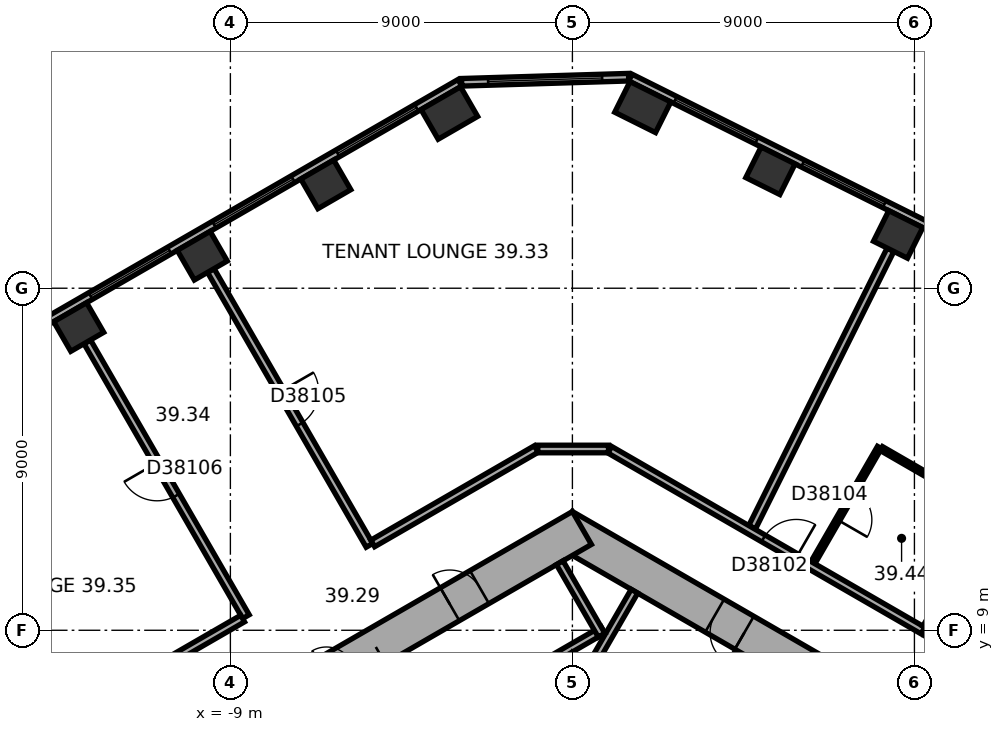
"""IFC4 building model, lengths in metres.
Left out: names, types, materials, properties, quantities, classifications, styles, units other than length and angle.
Written with IfcOpenShell. Run it as: python <this file> out.ifc"""

import sys

from ifc_helpers import new_model, si_unit, direction, frame, frame_2d, origin, origin_2d, place, context, subcontext, project, spatial, rectangle, extrude, element, fill, save


model = new_model("IFC4")
c1 = context("Model", 3, precision=1e-05, world=origin(), true_north=direction((0.0, 1.0)))
c2 = subcontext(c1, "Body", "Model", "MODEL_VIEW")
j1 = project(units=[si_unit("LENGTHUNIT", "METRE"), si_unit("PLANEANGLEUNIT", "RADIAN")], contexts=[c1])
p1 = place(None, origin())
s1 = spatial("IfcSite", under=j1, at=p1, CompositionType="ELEMENT")
p2 = place(p1, origin())
s2 = spatial("IfcBuilding", under=s1, at=p2, CompositionType="ELEMENT")
p3 = place(p2, frame((0.0, 0.0, 161.4)))
s3 = spatial("IfcBuildingStorey", under=s2, at=p3, CompositionType="ELEMENT", Elevation=161.4)
for number, where, z_axis, x_axis in (
    (1, (8.571, 19.416, 0.0), (0.0, 0.0, 1.0), (-0.895, 0.446, 0.0)),
    (2, (5.211, 21.091, 0.0), (0.0, 0.0, 1.0), (-0.895, 0.446, 0.0)),
):
    element("IfcColumn", number, at=place(p3, frame(where, z_axis=z_axis, x_axis=x_axis)), inside=s3, PredefinedType="COLUMN", context=c2, shape_type="SweptSolid", body=[
        extrude(rectangle(XDim=1.0, YDim=0.9, at=origin_2d()), origin(), (0.0, 0.0, 1.0), 3.7),
    ])
for number, where, z_axis, x_axis in (
    (3, (1.852, 22.766, 0.0), (0.0, 0.0, 1.0), (-0.895, 0.446, 0.0)),
    (4, (-3.238, 22.61, 0.0), (0.0, 0.0, 1.0), (-0.866, -0.5, 0.0)),
):
    element("IfcColumn", number, at=place(p3, frame(where, z_axis=z_axis, x_axis=x_axis)), inside=s3, PredefinedType="COLUMN", context=c2, shape_type="SweptSolid", body=[
        extrude(rectangle(XDim=1.2, YDim=0.9, at=origin_2d()), origin(), (0.0, 0.0, 1.0), 3.7),
    ])
for number, where, z_axis, x_axis in (
    (5, (-6.489, 20.733, 0.0), (0.0, 0.0, 1.0), (-0.866, -0.5, 0.0)),
    (6, (-9.74, 18.856, 0.0), (0.0, 0.0, 1.0), (-0.866, -0.5, 0.0)),
    (7, (-12.991, 16.979, 0.0), (0.0, 0.0, 1.0), (-0.866, -0.5, 0.0)),
):
    element("IfcColumn", number, at=place(p3, frame(where, z_axis=z_axis, x_axis=x_axis)), inside=s3, PredefinedType="COLUMN", context=c2, shape_type="SweptSolid", body=[
        extrude(rectangle(XDim=1.0, YDim=0.9, at=origin_2d()), origin(), (0.0, 0.0, 1.0), 3.7),
    ])
p4 = place(p3, frame((10.25, 5.629, 0.0), z_axis=(0.0, 0.0, 1.0), x_axis=(-0.866022616891, 0.50000482701, 0.0)))
e8 = element("IfcWall", 8, at=p4, inside=s3, PredefinedType="SHEAR", context=c2, shape_type="SweptSolid", body=[
    extrude(rectangle(XDim=12.125, YDim=1.0, at=frame_2d((6.062, 0.0))), origin(), (0.0, 0.0, 1.0), 3.7),
])
p5 = place(p4, frame((2.712, 0.0, 0.0)))
e9 = element("IfcOpeningElement", 9, at=p5, cuts=e8, PredefinedType="OPENING", context=c2, shape_type="SweptSolid", body=[
    extrude(rectangle(XDim=0.9, YDim=2.1, at=frame_2d((0.45, 1.05))), frame((0.0, 0.51, 0.0), z_axis=(0.0, -1.0, 0.0), x_axis=(1.0, 0.0, 0.0)), (0.0, 0.0, 1.0), 1.02),
])
p6 = place(p4, frame((6.612, 0.0, 0.0)))
e10 = element("IfcOpeningElement", 10, at=p6, cuts=e8, PredefinedType="OPENING", context=c2, shape_type="SweptSolid", body=[
    extrude(rectangle(XDim=0.9, YDim=2.1, at=frame_2d((0.45, 1.05))), frame((0.0, 0.51, 0.0), z_axis=(0.0, -1.0, 0.0), x_axis=(1.0, 0.0, 0.0)), (0.0, 0.0, 1.0), 1.02),
])
p7 = place(p3, frame((0.25, 11.691, 0.0), z_axis=(0.0, 0.0, 1.0), x_axis=(-0.866022616891, -0.50000482701, 0.0)))
e11 = element("IfcWall", 11, at=p7, inside=s3, PredefinedType="SHEAR", context=c2, shape_type="SweptSolid", body=[
    extrude(rectangle(XDim=12.125, YDim=1.0, at=frame_2d((6.062, 0.0))), origin(), (0.0, 0.0, 1.0), 3.7),
])
p8 = place(p7, frame((6.262, 0.0, 0.0)))
e12 = element("IfcOpeningElement", 12, at=p8, cuts=e11, PredefinedType="OPENING", context=c2, shape_type="SweptSolid", body=[
    extrude(rectangle(XDim=1.5, YDim=2.1, at=frame_2d((0.75, 1.05))), frame((0.0, 0.51, 0.0), z_axis=(0.0, -1.0, 0.0), x_axis=(1.0, 0.0, 0.0)), (0.0, 0.0, 1.0), 1.02),
])
p9 = place(p7, frame((3.112, 0.0, 0.0)))
e13 = element("IfcOpeningElement", 13, at=p9, cuts=e11, PredefinedType="OPENING", context=c2, shape_type="SweptSolid", body=[
    extrude(rectangle(XDim=0.9, YDim=2.1, at=frame_2d((0.45, 1.05))), frame((0.0, 0.51, 0.0), z_axis=(0.0, -1.0, 0.0), x_axis=(1.0, 0.0, 0.0)), (0.0, 0.0, 1.0), 1.02),
])
p10 = place(p3, frame((19.464, 14.599, 0.0), z_axis=(0.0, 0.0, 1.0), x_axis=(-0.894935755043, 0.446195018289, 0.0)))
e14 = element("IfcWall", 14, at=p10, inside=s3, PredefinedType="STANDARD", context=c2, shape_type="SweptSolid", body=[
    extrude(rectangle(XDim=20.044, YDim=0.2, at=frame_2d((10.022, 0.0))), origin(), (0.0, 0.0, 1.0), 3.7),
])
p11 = place(p10, frame((1.313, 0.0, 0.9)))
e15 = element("IfcOpeningElement", 15, at=p11, cuts=e14, PredefinedType="OPENING", context=c2, shape_type="SweptSolid", body=[
    extrude(rectangle(XDim=2.4, YDim=2.0, at=frame_2d((1.2, 1.0))), frame((0.0, 0.11, 0.0), z_axis=(0.0, -1.0, 0.0), x_axis=(1.0, 0.0, 0.0)), (0.0, 0.0, 1.0), 0.22),
])
p12 = place(p10, frame((5.067, 0.0, 0.9)))
e16 = element("IfcOpeningElement", 16, at=p12, cuts=e14, PredefinedType="OPENING", context=c2, shape_type="SweptSolid", body=[
    extrude(rectangle(XDim=2.4, YDim=2.0, at=frame_2d((1.2, 1.0))), frame((0.0, 0.11, 0.0), z_axis=(0.0, -1.0, 0.0), x_axis=(1.0, 0.0, 0.0)), (0.0, 0.0, 1.0), 0.22),
])
p13 = place(p10, frame((8.821, 0.0, 0.9)))
e17 = element("IfcOpeningElement", 17, at=p13, cuts=e14, PredefinedType="OPENING", context=c2, shape_type="SweptSolid", body=[
    extrude(rectangle(XDim=2.4, YDim=2.0, at=frame_2d((1.2, 1.0))), frame((0.0, 0.11, 0.0), z_axis=(0.0, -1.0, 0.0), x_axis=(1.0, 0.0, 0.0)), (0.0, 0.0, 1.0), 0.22),
])
p14 = place(p10, frame((12.575, 0.0, 0.9)))
e18 = element("IfcOpeningElement", 18, at=p14, cuts=e14, PredefinedType="OPENING", context=c2, shape_type="SweptSolid", body=[
    extrude(rectangle(XDim=2.4, YDim=2.0, at=frame_2d((1.2, 1.0))), frame((0.0, 0.11, 0.0), z_axis=(0.0, -1.0, 0.0), x_axis=(1.0, 0.0, 0.0)), (0.0, 0.0, 1.0), 0.22),
])
p15 = place(p10, frame((16.329, 0.0, 0.9)))
e19 = element("IfcOpeningElement", 19, at=p15, cuts=e14, PredefinedType="OPENING", context=c2, shape_type="SweptSolid", body=[
    extrude(rectangle(XDim=2.4, YDim=2.0, at=frame_2d((1.2, 1.0))), frame((0.0, 0.11, 0.0), z_axis=(0.0, -1.0, 0.0), x_axis=(1.0, 0.0, 0.0)), (0.0, 0.0, 1.0), 0.22),
])
p16 = place(p3, frame((1.479, 23.553, 0.0), z_axis=(0.0, 0.0, 1.0), x_axis=(-0.999534786117, -0.03049936625, 0.0)))
e20 = element("IfcWall", 20, at=p16, inside=s3, PredefinedType="STANDARD", context=c2, shape_type="SweptSolid", body=[
    extrude(rectangle(XDim=4.395, YDim=0.2, at=frame_2d((2.197, 0.0))), origin(), (0.0, 0.0, 1.0), 3.7),
])
p17 = place(p16, frame((0.698, 0.0, 0.9)))
e21 = element("IfcOpeningElement", 21, at=p17, cuts=e20, PredefinedType="OPENING", context=c2, shape_type="SweptSolid", body=[
    extrude(rectangle(XDim=3.0, YDim=2.0, at=frame_2d((1.5, 1.0))), frame((0.0, 0.11, 0.0), z_axis=(0.0, -1.0, 0.0), x_axis=(1.0, 0.0, 0.0)), (0.0, 0.0, 1.0), 0.22),
])
p18 = place(p3, frame((-2.961, 23.405, 0.0), z_axis=(0.0, 0.0, 1.0), x_axis=(-0.866023315909, -0.500003616288, 0.0)))
e22 = element("IfcWall", 22, at=p18, inside=s3, PredefinedType="STANDARD", context=c2, shape_type="SweptSolid", body=[
    extrude(rectangle(XDim=20.044, YDim=0.2, at=frame_2d((10.022, 0.0))), origin(), (0.0, 0.0, 1.0), 3.7),
])
p19 = place(p18, frame((1.314, 0.0, 0.9)))
e23 = element("IfcOpeningElement", 23, at=p19, cuts=e22, PredefinedType="OPENING", context=c2, shape_type="SweptSolid", body=[
    extrude(rectangle(XDim=2.4, YDim=2.0, at=frame_2d((1.2, 1.0))), frame((0.0, 0.11, 0.0), z_axis=(0.0, -1.0, 0.0), x_axis=(1.0, 0.0, 0.0)), (0.0, 0.0, 1.0), 0.22),
])
p20 = place(p18, frame((5.069, 0.0, 0.9)))
e24 = element("IfcOpeningElement", 24, at=p20, cuts=e22, PredefinedType="OPENING", context=c2, shape_type="SweptSolid", body=[
    extrude(rectangle(XDim=2.4, YDim=2.0, at=frame_2d((1.2, 1.0))), frame((0.0, 0.11, 0.0), z_axis=(0.0, -1.0, 0.0), x_axis=(1.0, 0.0, 0.0)), (0.0, 0.0, 1.0), 0.22),
])
p21 = place(p18, frame((8.823, 0.0, 0.9)))
e25 = element("IfcOpeningElement", 25, at=p21, cuts=e22, PredefinedType="OPENING", context=c2, shape_type="SweptSolid", body=[
    extrude(rectangle(XDim=2.4, YDim=2.0, at=frame_2d((1.2, 1.0))), frame((0.0, 0.11, 0.0), z_axis=(0.0, -1.0, 0.0), x_axis=(1.0, 0.0, 0.0)), (0.0, 0.0, 1.0), 0.22),
])
p22 = place(p18, frame((12.577, 0.0, 0.9)))
e26 = element("IfcOpeningElement", 26, at=p22, cuts=e22, PredefinedType="OPENING", context=c2, shape_type="SweptSolid", body=[
    extrude(rectangle(XDim=2.4, YDim=2.0, at=frame_2d((1.2, 1.0))), frame((0.0, 0.11, 0.0), z_axis=(0.0, -1.0, 0.0), x_axis=(1.0, 0.0, 0.0)), (0.0, 0.0, 1.0), 0.22),
])
p23 = place(p18, frame((16.331, 0.0, 0.9)))
e27 = element("IfcOpeningElement", 27, at=p23, cuts=e22, PredefinedType="OPENING", context=c2, shape_type="SweptSolid", body=[
    extrude(rectangle(XDim=2.4, YDim=2.0, at=frame_2d((1.2, 1.0))), frame((0.0, 0.11, 0.0), z_axis=(0.0, -1.0, 0.0), x_axis=(1.0, 0.0, 0.0)), (0.0, 0.0, 1.0), 0.22),
])
p24 = place(p3, frame((0.532, 8.122, 0.0), z_axis=(0.0, 0.0, 1.0), x_axis=(0.500077893725, 0.86598042715, 0.0)))
e28 = element("IfcWall", 28, at=p24, inside=s3, PredefinedType="PARTITIONING", context=c2, shape_type="SweptSolid", body=[
    extrude(rectangle(XDim=2.2, YDim=0.2, at=frame_2d((1.1, 0.0))), origin(), (0.0, 0.0, 1.0), 3.42),
])
p25 = place(p3, frame((0.803, 9.009, 0.0), z_axis=(0.0, 0.0, 1.0), x_axis=(-0.866028230842, -0.499995103361, 0.0)))
e29 = element("IfcWall", 29, at=p25, inside=s3, PredefinedType="PARTITIONING", context=c2, shape_type="SweptSolid", body=[
    extrude(rectangle(XDim=5.4, YDim=0.2, at=frame_2d((2.7, 0.0))), origin(), (0.0, 0.0, 1.0), 3.42),
])
p26 = place(p3, frame((0.767, 8.872, 0.0), z_axis=(0.0, 0.0, 1.0), x_axis=(-0.499994660107, 0.866028486751, 0.0)))
e30 = element("IfcWall", 30, at=p26, inside=s3, PredefinedType="PARTITIONING", context=c2, shape_type="SweptSolid", body=[
    extrude(rectangle(XDim=2.2, YDim=0.2, at=frame_2d((1.1, 0.0))), origin(), (0.0, 0.0, 1.0), 3.42),
])
p27 = place(p3, frame((-2.216, 4.282, 0.0), z_axis=(0.0, 0.0, 1.0), x_axis=(0.499977259774, 0.866038532462, 0.0)))
e31 = element("IfcWall", 31, at=p27, inside=s3, PredefinedType="SHEAR", context=c2, shape_type="SweptSolid", body=[
    extrude(rectangle(XDim=4.7, YDim=0.3, at=frame_2d((2.35, 0.0))), origin(), (0.0, 0.0, 1.0), 3.42),
])
p28 = place(p3, frame((-12.766, 16.589, 0.0), z_axis=(0.0, 0.0, 1.0), x_axis=(0.500010139422, -0.866019549707, 0.0)))
e32 = element("IfcWall", 32, at=p28, inside=s3, PredefinedType="PARTITIONING", context=c2, shape_type="SweptSolid", body=[
    extrude(rectangle(XDim=8.35, YDim=0.2, at=frame_2d((4.175, 0.0))), origin(), (0.0, 0.0, 1.0), 3.42),
])
p29 = place(p28, frame((3.675, 0.0, 0.0)))
e33 = element("IfcOpeningElement", 33, at=p29, cuts=e32, PredefinedType="OPENING", context=c2, shape_type="SweptSolid", body=[
    extrude(rectangle(XDim=1.0, YDim=2.1, at=frame_2d((0.5, 1.05))), frame((0.0, 0.11, 0.0), z_axis=(0.0, -1.0, 0.0), x_axis=(1.0, 0.0, 0.0)), (0.0, 0.0, 1.0), 0.22),
])
p30 = place(p3, frame((-9.515, 18.466, 0.0), z_axis=(0.0, 0.0, 1.0), x_axis=(0.500010139422, -0.866019549707, 0.0)))
e34 = element("IfcWall", 34, at=p30, inside=s3, PredefinedType="PARTITIONING", context=c2, shape_type="SweptSolid", body=[
    extrude(rectangle(XDim=8.35, YDim=0.2, at=frame_2d((4.175, 0.0))), origin(), (0.0, 0.0, 1.0), 2.87),
])
p31 = place(p30, frame((3.675, 0.0, 0.0)))
e35 = element("IfcOpeningElement", 35, at=p31, cuts=e34, PredefinedType="OPENING", context=c2, shape_type="SweptSolid", body=[
    extrude(rectangle(XDim=1.0, YDim=2.1, at=frame_2d((0.5, 1.05))), frame((0.0, 0.11, 0.0), z_axis=(0.0, -1.0, 0.0), x_axis=(1.0, 0.0, 0.0)), (0.0, 0.0, 1.0), 0.22),
])
p32 = place(p3, frame((-8.678, 9.308, 0.0), z_axis=(0.0, 0.0, 1.0), x_axis=(-0.866000359435, -0.500043375578, 0.0)))
e36 = element("IfcWall", 36, at=p32, inside=s3, PredefinedType="PARTITIONING", context=c2, shape_type="SweptSolid", body=[
    extrude(rectangle(XDim=3.161, YDim=0.2, at=frame_2d((1.581, 0.0))), origin(), (0.0, 0.0, 1.0), 3.42),
])
p33 = place(p3, frame((-0.95, 13.77, 0.0), z_axis=(0.0, 0.0, 1.0), x_axis=(-0.866036689987, -0.499980451214, 0.0)))
e37 = element("IfcWall", 37, at=p33, inside=s3, PredefinedType="PARTITIONING", context=c2, shape_type="SweptSolid", body=[
    extrude(rectangle(XDim=4.969, YDim=0.2, at=frame_2d((2.485, 0.0))), origin(), (0.0, 0.0, 1.0), 3.42),
])
p34 = place(p3, frame((0.95, 13.77, 0.0), z_axis=(0.0, 0.0, 1.0), x_axis=(-1.0, 0.0, 0.0)))
e38 = element("IfcWall", 38, at=p34, inside=s3, PredefinedType="PARTITIONING", context=c2, shape_type="SweptSolid", body=[
    extrude(rectangle(XDim=1.86, YDim=0.2, at=frame_2d((0.93, 0.0))), origin(), (0.0, 0.0, 1.0), 3.42),
])
p35 = place(p3, frame((6.33, 10.779, 0.0), z_axis=(0.0, 0.0, 1.0), x_axis=(0.500010275428, 0.866019471182, 0.0)))
e39 = element("IfcWall", 39, at=p35, inside=s3, PredefinedType="PARTITIONING", context=c2, shape_type="SweptSolid", body=[
    extrude(rectangle(XDim=3.5, YDim=0.12, at=frame_2d((1.75, 0.0))), origin(), (0.0, 0.0, 1.0), 3.42),
])
p36 = place(p35, frame((1.3, 0.0, 0.0)))
e40 = element("IfcOpeningElement", 40, at=p36, cuts=e39, PredefinedType="OPENING", context=c2, shape_type="SweptSolid", body=[
    extrude(rectangle(XDim=0.9, YDim=2.1, at=frame_2d((0.45, 1.05))), frame((0.0, 0.07, 0.0), z_axis=(0.0, -1.0, 0.0), x_axis=(1.0, 0.0, 0.0)), (0.0, 0.0, 1.0), 0.14),
])
p37 = place(p3, frame((8.132, 13.78, 0.0), z_axis=(0.0, 0.0, 1.0), x_axis=(0.866039519639, -0.499975549825, 0.0)))
e41 = element("IfcWall", 41, at=p37, inside=s3, PredefinedType="PARTITIONING", context=c2, shape_type="SweptSolid", body=[
    extrude(rectangle(XDim=3.34, YDim=0.12, at=frame_2d((1.67, 0.0))), origin(), (0.0, 0.0, 1.0), 3.42),
])
p38 = place(p3, frame((8.37, 19.013, 0.0), z_axis=(0.0, 0.0, 1.0), x_axis=(-0.446183598632, -0.894941448538, 0.0)))
e42 = element("IfcWall", 42, at=p38, inside=s3, PredefinedType="PARTITIONING", context=c2, shape_type="SweptSolid", body=[
    extrude(rectangle(XDim=8.156, YDim=0.2, at=frame_2d((4.078, 0.0))), origin(), (0.0, 0.0, 1.0), 3.42),
])
p39 = place(p3, frame((9.224, 8.993, 0.0), z_axis=(0.0, 0.0, 1.0), x_axis=(-0.866031754707, 0.499988999718, 0.0)))
e43 = element("IfcWall", 43, at=p39, inside=s3, PredefinedType="PARTITIONING", context=c2, shape_type="SweptSolid", body=[
    extrude(rectangle(XDim=9.514, YDim=0.2, at=frame_2d((4.757, 0.0))), origin(), (0.0, 0.0, 1.0), 3.42),
])
p40 = place(p39, frame((3.848, 0.0, 0.0)))
e44 = element("IfcOpeningElement", 44, at=p40, cuts=e43, PredefinedType="OPENING", context=c2, shape_type="SweptSolid", body=[
    extrude(rectangle(XDim=1.0, YDim=2.1, at=frame_2d((0.5, 1.05))), frame((0.0, 0.11, 0.0), z_axis=(0.0, -1.0, 0.0), x_axis=(1.0, 0.0, 0.0)), (0.0, 0.0, 1.0), 0.22),
])
p41 = place(p3, frame((10.994, 12.058, 0.0), z_axis=(0.0, 0.0, 1.0), x_axis=(-0.500009156386, -0.866020117278, 0.0)))
e45 = element("IfcWall", 45, at=p41, inside=s3, PredefinedType="PARTITIONING", context=c2, shape_type="SweptSolid", body=[
    extrude(rectangle(XDim=3.44, YDim=0.12, at=frame_2d((1.72, 0.0))), origin(), (0.0, 0.0, 1.0), 3.42),
])
p42 = place(p3, frame((11.233, 7.833, 0.0), z_axis=(0.0, 0.0, 1.0), x_axis=(-0.866008176907, 0.50002983664, 0.0)))
e46 = element("IfcWall", 46, at=p42, inside=s3, PredefinedType="PARTITIONING", context=c2, shape_type="SweptSolid", body=[
    extrude(rectangle(XDim=2.2, YDim=0.2, at=frame_2d((1.1, 0.0))), origin(), (0.0, 0.0, 1.0), 3.42),
])
p43 = place(p14, origin())
e47 = element("IfcWindow", 47, at=p43, inside=s3, PartitioningType="SINGLE_PANEL", PredefinedType="WINDOW", context=c2, shape_type="SweptSolid", body=[
    extrude(rectangle(XDim=2.4, YDim=2.0, at=frame_2d((1.2, 1.0))), frame((0.0, 0.03, 0.0), z_axis=(0.0, -1.0, 0.0), x_axis=(1.0, 0.0, 0.0)), (0.0, 0.0, 1.0), 0.06),
])
fill(e18, e47)
p44 = place(p15, origin())
e48 = element("IfcWindow", 48, at=p44, inside=s3, PartitioningType="SINGLE_PANEL", PredefinedType="WINDOW", context=c2, shape_type="SweptSolid", body=[
    extrude(rectangle(XDim=2.4, YDim=2.0, at=frame_2d((1.2, 1.0))), frame((0.0, 0.03, 0.0), z_axis=(0.0, -1.0, 0.0), x_axis=(1.0, 0.0, 0.0)), (0.0, 0.0, 1.0), 0.06),
])
fill(e19, e48)
p45 = place(p17, origin())
e49 = element("IfcWindow", 49, at=p45, inside=s3, PartitioningType="SINGLE_PANEL", PredefinedType="WINDOW", context=c2, shape_type="SweptSolid", body=[
    extrude(rectangle(XDim=3.0, YDim=2.0, at=frame_2d((1.5, 1.0))), frame((0.0, 0.03, 0.0), z_axis=(0.0, -1.0, 0.0), x_axis=(1.0, 0.0, 0.0)), (0.0, 0.0, 1.0), 0.06),
])
fill(e21, e49)
p46 = place(p19, origin())
e50 = element("IfcWindow", 50, at=p46, inside=s3, PartitioningType="SINGLE_PANEL", PredefinedType="WINDOW", context=c2, shape_type="SweptSolid", body=[
    extrude(rectangle(XDim=2.4, YDim=2.0, at=frame_2d((1.2, 1.0))), frame((0.0, 0.03, 0.0), z_axis=(0.0, -1.0, 0.0), x_axis=(1.0, 0.0, 0.0)), (0.0, 0.0, 1.0), 0.06),
])
fill(e23, e50)
p47 = place(p20, origin())
e51 = element("IfcWindow", 51, at=p47, inside=s3, PartitioningType="SINGLE_PANEL", PredefinedType="WINDOW", context=c2, shape_type="SweptSolid", body=[
    extrude(rectangle(XDim=2.4, YDim=2.0, at=frame_2d((1.2, 1.0))), frame((0.0, 0.03, 0.0), z_axis=(0.0, -1.0, 0.0), x_axis=(1.0, 0.0, 0.0)), (0.0, 0.0, 1.0), 0.06),
])
fill(e24, e51)
p48 = place(p21, origin())
e52 = element("IfcWindow", 52, at=p48, inside=s3, PartitioningType="SINGLE_PANEL", PredefinedType="WINDOW", context=c2, shape_type="SweptSolid", body=[
    extrude(rectangle(XDim=2.4, YDim=2.0, at=frame_2d((1.2, 1.0))), frame((0.0, 0.03, 0.0), z_axis=(0.0, -1.0, 0.0), x_axis=(1.0, 0.0, 0.0)), (0.0, 0.0, 1.0), 0.06),
])
fill(e25, e52)
p49 = place(p8, origin())
e53 = element("IfcDoor", 53, at=p49, inside=s3, OperationType="DOUBLE_DOOR_SINGLE_SWING", PredefinedType="DOOR", context=c2, shape_type="SweptSolid", body=[
    extrude(rectangle(XDim=1.5, YDim=2.1, at=frame_2d((0.75, 1.05))), frame((0.0, 0.025, 0.0), z_axis=(0.0, -1.0, 0.0), x_axis=(1.0, 0.0, 0.0)), (0.0, 0.0, 1.0), 0.05),
])
fill(e12, e53)
p50 = place(p6, origin())
e54 = element("IfcDoor", 54, at=p50, inside=s3, OperationType="SINGLE_SWING_LEFT", PredefinedType="DOOR", context=c2, shape_type="SweptSolid", body=[
    extrude(rectangle(XDim=0.9, YDim=2.1, at=frame_2d((0.45, 1.05))), frame((0.0, 0.025, 0.0), z_axis=(0.0, -1.0, 0.0), x_axis=(1.0, 0.0, 0.0)), (0.0, 0.0, 1.0), 0.05),
])
fill(e10, e54)
p51 = place(p9, origin())
e55 = element("IfcDoor", 55, at=p51, inside=s3, OperationType="SINGLE_SWING_LEFT", PredefinedType="DOOR", context=c2, shape_type="SweptSolid", body=[
    extrude(rectangle(XDim=0.9, YDim=2.1, at=frame_2d((0.45, 1.05))), frame((0.0, 0.025, 0.0), z_axis=(0.0, -1.0, 0.0), x_axis=(1.0, 0.0, 0.0)), (0.0, 0.0, 1.0), 0.05),
])
fill(e13, e55)
p52 = place(p40, origin())
e56 = element("IfcDoor", 56, at=p52, inside=s3, OperationType="SINGLE_SWING_LEFT", PredefinedType="DOOR", context=c2, shape_type="SweptSolid", body=[
    extrude(rectangle(XDim=1.0, YDim=2.1, at=frame_2d((0.5, 1.05))), frame((0.0, 0.025, 0.0), z_axis=(0.0, -1.0, 0.0), x_axis=(1.0, 0.0, 0.0)), (0.0, 0.0, 1.0), 0.05),
])
fill(e44, e56)
p53 = place(p36, origin())
e57 = element("IfcDoor", 57, at=p53, inside=s3, OperationType="SINGLE_SWING_LEFT", PredefinedType="DOOR", context=c2, shape_type="SweptSolid", body=[
    extrude(rectangle(XDim=0.9, YDim=2.1, at=frame_2d((0.45, 1.05))), frame((0.0, 0.025, 0.0), z_axis=(0.0, -1.0, 0.0), x_axis=(1.0, 0.0, 0.0)), (0.0, 0.0, 1.0), 0.05),
])
fill(e40, e57)
p54 = place(p31, origin())
e58 = element("IfcDoor", 58, at=p54, inside=s3, OperationType="SINGLE_SWING_LEFT", PredefinedType="DOOR", context=c2, shape_type="SweptSolid", body=[
    extrude(rectangle(XDim=1.0, YDim=2.1, at=frame_2d((0.5, 1.05))), frame((0.0, 0.025, 0.0), z_axis=(0.0, -1.0, 0.0), x_axis=(1.0, 0.0, 0.0)), (0.0, 0.0, 1.0), 0.05),
])
fill(e35, e58)
p55 = place(p29, origin())
e59 = element("IfcDoor", 59, at=p55, inside=s3, OperationType="SINGLE_SWING_LEFT", PredefinedType="DOOR", context=c2, shape_type="SweptSolid", body=[
    extrude(rectangle(XDim=1.0, YDim=2.1, at=frame_2d((0.5, 1.05))), frame((0.0, 0.025, 0.0), z_axis=(0.0, -1.0, 0.0), x_axis=(1.0, 0.0, 0.0)), (0.0, 0.0, 1.0), 0.05),
])
fill(e33, e59)
save(model, sys.argv[1])
